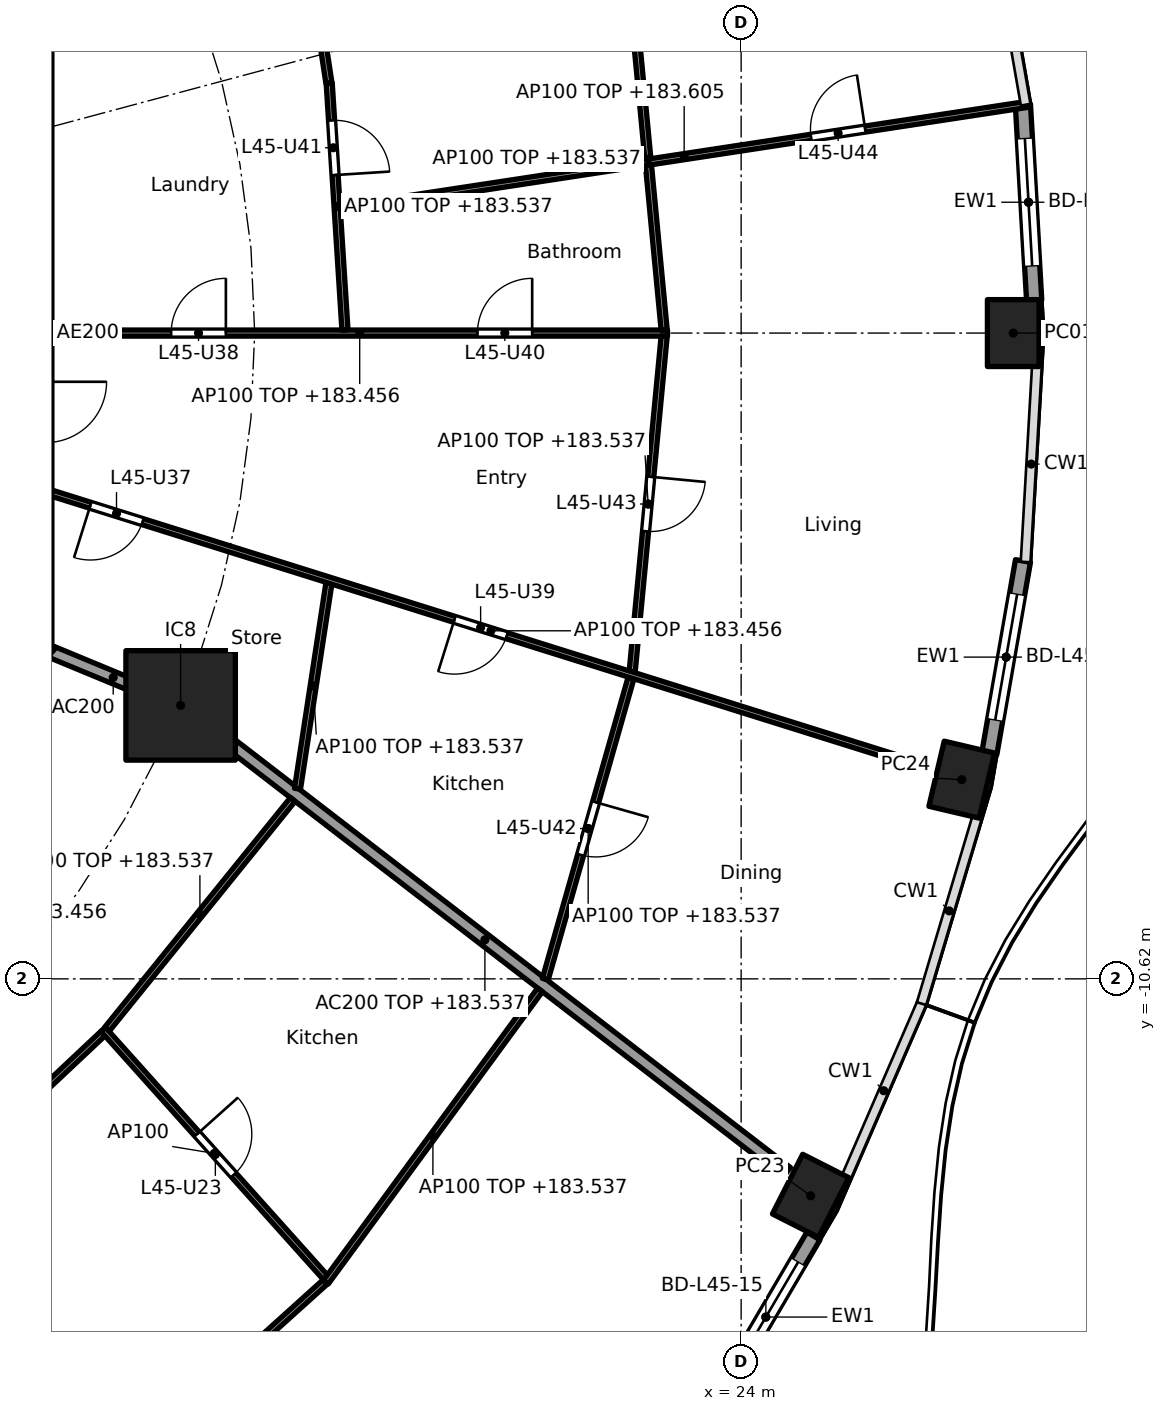
"""IFC4 building model, lengths in metres.
Left out: names, types, materials, properties, quantities, classifications, styles, units other than length and angle.
Written with IfcOpenShell. Run it as: python <this file> out.ifc"""

import sys

from ifc_helpers import new_model, si_unit, direction, frame, frame_2d, origin, origin_2d, place, context, subcontext, project, spatial, rectangle, hollow_rectangle, extrude, element, fill, save


model = new_model("IFC4")
c1 = context("Model", 3, precision=1e-05, world=origin(), true_north=direction((0.0, 1.0)))
c2 = subcontext(c1, "Body", "Model", "MODEL_VIEW")
j1 = project(units=[si_unit("LENGTHUNIT", "METRE"), si_unit("PLANEANGLEUNIT", "RADIAN")], contexts=[c1])
p1 = place(None, origin())
s1 = spatial("IfcSite", under=j1, at=p1, CompositionType="ELEMENT")
p2 = place(p1, origin())
s2 = spatial("IfcBuilding", under=s1, at=p2, CompositionType="ELEMENT")
p3 = place(p2, frame((0.0, 0.0, 180.7)))
s3 = spatial("IfcBuildingStorey", under=s2, at=p3, CompositionType="ELEMENT", Elevation=180.7)
for number, where, z_axis, x_axis in (
    (1, (28.475, 0.0, 0.0), (0.0, 0.0, 1.0), (0.0, 1.0, 0.0)),
    (2, (25.142, -14.188, 0.0), (0.0, 0.0, 1.0), (0.452, 0.892, 0.0)),
    (3, (27.627, -7.344, 0.0), (0.0, 0.0, 1.0), (0.229, 0.973, 0.0)),
):
    element("IfcColumn", number, at=place(p3, frame(where, z_axis=z_axis, x_axis=x_axis)), inside=s3, PredefinedType="COLUMN", context=c2, shape_type="SweptSolid", body=[
        extrude(hollow_rectangle(XDim=1.1, YDim=0.85, WallThickness=0.036, at=origin_2d()), origin(), (0.0, 0.0, 1.0), 3.7),
    ])
p4 = place(p3, frame((14.782, -6.123, 0.0), z_axis=(0.0, 0.0, 1.0), x_axis=(1.0, 0.0, 0.0)))
e4 = element("IfcColumn", 4, at=p4, inside=s3, PredefinedType="COLUMN", context=c2, shape_type="SweptSolid", body=[
    extrude(rectangle(XDim=1.8, YDim=1.8, at=origin_2d()), origin(), (0.0, 0.0, 1.0), 3.7),
])
p5 = place(p3, frame((28.633, 3.762, 0.0), z_axis=(0.0, 0.0, 1.0), x_axis=(0.057532692854, -0.998343622834, 0.0)))
e5 = element("IfcWall", 5, at=p5, inside=s3, PredefinedType="SOLIDWALL", context=c2, shape_type="SweptSolid", body=[
    extrude(rectangle(XDim=3.225, YDim=0.25, at=frame_2d((1.613, 0.0))), origin(), (0.0, 0.0, 1.0), 3.44),
])
p6 = place(p5, frame((0.562, 0.0, 0.0)))
e6 = element("IfcOpeningElement", 6, at=p6, cuts=e5, PredefinedType="OPENING", context=c2, shape_type="SweptSolid", body=[
    extrude(rectangle(XDim=2.1, YDim=2.4, at=frame_2d((1.05, 1.2))), frame((0.0, 0.135, 0.0), z_axis=(0.0, -1.0, 0.0), x_axis=(1.0, 0.0, 0.0)), (0.0, 0.0, 1.0), 0.27),
])
p7 = place(p3, frame((25.189, -14.848, 0.0), z_axis=(0.0, 0.0, 1.0), x_axis=(-0.506367803691, -0.862317602386, 0.0)))
e7 = element("IfcWall", 7, at=p7, inside=s3, PredefinedType="SOLIDWALL", context=c2, shape_type="SweptSolid", body=[
    extrude(rectangle(XDim=3.092, YDim=0.25, at=frame_2d((1.546, 0.0))), origin(), (0.0, 0.0, 1.0), 3.44),
])
p8 = place(p7, frame((0.496, 0.0, 0.0)))
e8 = element("IfcOpeningElement", 8, at=p8, cuts=e7, PredefinedType="OPENING", context=c2, shape_type="SweptSolid", body=[
    extrude(rectangle(XDim=2.1, YDim=2.4, at=frame_2d((1.05, 1.2))), frame((0.0, 0.135, 0.0), z_axis=(0.0, -1.0, 0.0), x_axis=(1.0, 0.0, 0.0)), (0.0, 0.0, 1.0), 0.27),
])
p9 = place(p3, frame((28.635, -3.747, 0.0), z_axis=(0.0, 0.0, 1.0), x_axis=(-0.172149769468, -0.985070787747, 0.0)))
e9 = element("IfcWall", 9, at=p9, inside=s3, PredefinedType="SOLIDWALL", context=c2, shape_type="SweptSolid", body=[
    extrude(rectangle(XDim=3.211, YDim=0.25, at=frame_2d((1.605, 0.0))), origin(), (0.0, 0.0, 1.0), 3.44),
])
p10 = place(p9, frame((0.555, 0.0, 0.0)))
e10 = element("IfcOpeningElement", 10, at=p10, cuts=e9, PredefinedType="OPENING", context=c2, shape_type="SweptSolid", body=[
    extrude(rectangle(XDim=2.1, YDim=2.4, at=frame_2d((1.05, 1.2))), frame((0.0, 0.135, 0.0), z_axis=(0.0, -1.0, 0.0), x_axis=(1.0, 0.0, 0.0)), (0.0, 0.0, 1.0), 0.27),
])
p11 = place(p3, frame((12.657, -5.243, 0.0), z_axis=(0.0, 0.0, 1.0), x_axis=(0.92383017907, -0.382802560388, 0.0)))
e11 = element("IfcWall", 11, at=p11, inside=s3, PredefinedType="PARTITIONING", context=c2, shape_type="SweptSolid", body=[
    extrude(rectangle(XDim=2.2, YDim=0.2, at=frame_2d((1.1, 0.0))), origin(), (0.0, 0.0, 1.0), 3.44),
])
p12 = place(p3, frame((14.822, -6.154, 0.0), z_axis=(0.0, 0.0, 1.0), x_axis=(0.792203056092, -0.610257583254, 0.0)))
e12 = element("IfcWall", 12, at=p12, inside=s3, PredefinedType="PARTITIONING", context=c2, shape_type="SweptSolid", body=[
    extrude(rectangle(XDim=12.533, YDim=0.2, at=frame_2d((6.266, 0.0))), origin(), (0.0, 0.0, 1.0), 2.837),
])
p13 = place(p3, frame((5.275, -12.494, 0.0), z_axis=(0.0, 0.0, 1.0), x_axis=(0.707106781187, 0.707106781187, 0.0)))
e13 = element("IfcWall", 13, at=p13, inside=s3, PredefinedType="PARTITIONING", context=c2, shape_type="SweptSolid", body=[
    extrude(rectangle(XDim=10.409, YDim=0.2, at=frame_2d((5.205, 0.0))), origin(), (0.0, 0.0, 1.0), 3.44),
])
p14 = place(p3, frame((12.665, 0.0, 0.0), z_axis=(0.0, 0.0, 1.0), x_axis=(1.0, 0.0, 0.0)))
e14 = element("IfcWall", 14, at=p14, inside=s3, PredefinedType="PARTITIONING", context=c2, shape_type="SweptSolid", body=[
    extrude(rectangle(XDim=10.124, YDim=0.1, at=frame_2d((5.062, 0.0))), origin(), (0.0, 0.0, 1.0), 2.756),
])
p15 = place(p14, frame((1.961, 0.0, 0.0)))
e15 = element("IfcOpeningElement", 15, at=p15, cuts=e14, PredefinedType="OPENING", context=c2, shape_type="SweptSolid", body=[
    extrude(rectangle(XDim=0.9, YDim=2.1, at=frame_2d((0.45, 1.05))), frame((0.0, 0.06, 0.0), z_axis=(0.0, -1.0, 0.0), x_axis=(1.0, 0.0, 0.0)), (0.0, 0.0, 1.0), 0.12),
])
p16 = place(p14, frame((6.999, 0.0, 0.0)))
e16 = element("IfcOpeningElement", 16, at=p16, cuts=e14, PredefinedType="OPENING", context=c2, shape_type="SweptSolid", body=[
    extrude(rectangle(XDim=0.9, YDim=2.1, at=frame_2d((0.45, 1.05))), frame((0.0, 0.06, 0.0), z_axis=(0.0, -1.0, 0.0), x_axis=(1.0, 0.0, 0.0)), (0.0, 0.0, 1.0), 0.12),
])
p17 = place(p3, frame((17.485, 0.05, 0.0), z_axis=(0.0, 0.0, 1.0), x_axis=(-0.063673473968, 0.997970785501, 0.0)))
e17 = element("IfcWall", 17, at=p17, inside=s3, PredefinedType="PARTITIONING", context=c2, shape_type="SweptSolid", body=[
    extrude(rectangle(XDim=4.072, YDim=0.1, at=frame_2d((2.036, 0.0))), origin(), (0.0, 0.0, 1.0), 2.837),
])
p18 = place(p17, frame((2.554, 0.0, 0.0)))
e18 = element("IfcOpeningElement", 18, at=p18, cuts=e17, PredefinedType="OPENING", context=c2, shape_type="SweptSolid", body=[
    extrude(rectangle(XDim=0.9, YDim=2.1, at=frame_2d((0.45, 1.05))), frame((0.0, 0.06, 0.0), z_axis=(0.0, -1.0, 0.0), x_axis=(1.0, 0.0, 0.0)), (0.0, 0.0, 1.0), 0.12),
])
p19 = place(p3, frame((22.734, 0.05, 0.0), z_axis=(0.0, 0.0, 1.0), x_axis=(-0.0949274088, 0.995484197292, 0.0)))
e19 = element("IfcWall", 19, at=p19, inside=s3, PredefinedType="PARTITIONING", context=c2, shape_type="SweptSolid", body=[
    extrude(rectangle(XDim=5.648, YDim=0.1, at=frame_2d((2.824, 0.0))), origin(), (0.0, 0.0, 1.0), 2.837),
])
p20 = place(p3, frame((22.734, -0.05, 0.0), z_axis=(0.0, 0.0, 1.0), x_axis=(-0.094923312677, -0.995484587882, 0.0)))
e20 = element("IfcWall", 20, at=p20, inside=s3, PredefinedType="PARTITIONING", context=c2, shape_type="SweptSolid", body=[
    extrude(rectangle(XDim=5.548, YDim=0.1, at=frame_2d((2.774, 0.0))), origin(), (0.0, 0.0, 1.0), 2.837),
])
p21 = place(p20, frame((2.324, 0.0, 0.0)))
e21 = element("IfcOpeningElement", 21, at=p21, cuts=e20, PredefinedType="OPENING", context=c2, shape_type="SweptSolid", body=[
    extrude(rectangle(XDim=0.9, YDim=2.1, at=frame_2d((0.45, 1.05))), frame((0.0, 0.06, 0.0), z_axis=(0.0, -1.0, 0.0), x_axis=(1.0, 0.0, 0.0)), (0.0, 0.0, 1.0), 0.12),
])
p22 = place(p3, frame((17.407, 2.039, 0.0), z_axis=(0.0, 0.0, 1.0), x_axis=(0.98858728603, 0.150649188184, 0.0)))
e22 = element("IfcWall", 22, at=p22, inside=s3, PredefinedType="PARTITIONING", context=c2, shape_type="SweptSolid", body=[
    extrude(rectangle(XDim=11.441, YDim=0.1, at=frame_2d((5.721, 0.0))), origin(), (0.0, 0.0, 1.0), 2.905),
])
p23 = place(p22, frame((7.832, 0.0, 0.0)))
e23 = element("IfcOpeningElement", 23, at=p23, cuts=e22, PredefinedType="OPENING", context=c2, shape_type="SweptSolid", body=[
    extrude(rectangle(XDim=0.9, YDim=2.1, at=frame_2d((0.45, 1.05))), frame((0.0, 0.06, 0.0), z_axis=(0.0, -1.0, 0.0), x_axis=(1.0, 0.0, 0.0)), (0.0, 0.0, 1.0), 0.12),
])
p24 = place(p3, frame((17.221, 4.113, 0.0), z_axis=(0.0, 0.0, 1.0), x_axis=(-0.1510806336, 0.988521442434, 0.0)))
e24 = element("IfcWall", 24, at=p24, inside=s3, PredefinedType="PARTITIONING", context=c2, shape_type="SweptSolid", body=[
    extrude(rectangle(XDim=3.419, YDim=0.1, at=frame_2d((1.71, 0.0))), origin(), (0.0, 0.0, 1.0), 2.837),
])
p25 = place(p3, frame((10.21, -14.614, 0.0), z_axis=(0.0, 0.0, 1.0), x_axis=(0.728883199496, 0.684638066055, 0.0)))
e25 = element("IfcWall", 25, at=p25, inside=s3, PredefinedType="PARTITIONING", context=c2, shape_type="SweptSolid", body=[
    extrude(rectangle(XDim=4.519, YDim=0.1, at=frame_2d((2.26, 0.0))), origin(), (0.0, 0.0, 1.0), 2.837),
])
p26 = place(p3, frame((13.045, -19.313, 0.0), z_axis=(0.0, 0.0, 1.0), x_axis=(0.742790086539, 0.66952437397, 0.0)))
e26 = element("IfcWall", 26, at=p26, inside=s3, PredefinedType="PARTITIONING", context=c2, shape_type="SweptSolid", body=[
    extrude(rectangle(XDim=5.542, YDim=0.1, at=frame_2d((2.771, 0.0))), origin(), (0.0, 0.0, 1.0), 2.837),
])
p27 = place(p26, frame((2.321, 0.0, 0.0)))
e27 = element("IfcOpeningElement", 27, at=p27, cuts=e26, PredefinedType="OPENING", context=c2, shape_type="SweptSolid", body=[
    extrude(rectangle(XDim=0.9, YDim=2.1, at=frame_2d((0.45, 1.05))), frame((0.0, 0.06, 0.0), z_axis=(0.0, -1.0, 0.0), x_axis=(1.0, 0.0, 0.0)), (0.0, 0.0, 1.0), 0.12),
])
p28 = place(p3, frame((13.507, -11.449, 0.0), z_axis=(0.0, 0.0, 1.0), x_axis=(0.667299792168, -0.744789223453, 0.0)))
e28 = element("IfcWall", 28, at=p28, inside=s3, PredefinedType="PARTITIONING", context=c2, shape_type="SweptSolid", body=[
    extrude(rectangle(XDim=5.482, YDim=0.1, at=frame_2d((2.741, 0.0))), origin(), (0.0, 0.0, 1.0), 3.44),
])
p29 = place(p28, frame((2.316, 0.0, 0.0)))
e29 = element("IfcOpeningElement", 29, at=p29, cuts=e28, PredefinedType="OPENING", context=c2, shape_type="SweptSolid", body=[
    extrude(rectangle(XDim=0.9, YDim=2.1, at=frame_2d((0.45, 1.05))), frame((0.0, 0.06, 0.0), z_axis=(0.0, -1.0, 0.0), x_axis=(1.0, 0.0, 0.0)), (0.0, 0.0, 1.0), 0.12),
])
p30 = place(p3, frame((13.572, -11.447, 0.0), z_axis=(0.0, 0.0, 1.0), x_axis=(0.628738316533, 0.777616955399, 0.0)))
e30 = element("IfcWall", 30, at=p30, inside=s3, PredefinedType="PARTITIONING", context=c2, shape_type="SweptSolid", body=[
    extrude(rectangle(XDim=4.857, YDim=0.1, at=frame_2d((2.429, 0.0))), origin(), (0.0, 0.0, 1.0), 2.837),
])
p31 = place(p3, frame((17.169, -15.609, 0.0), z_axis=(0.0, 0.0, 1.0), x_axis=(0.591122127251, 0.806582066918, 0.0)))
e31 = element("IfcWall", 31, at=p31, inside=s3, PredefinedType="PARTITIONING", context=c2, shape_type="SweptSolid", body=[
    extrude(rectangle(XDim=5.96, YDim=0.1, at=frame_2d((2.98, 0.0))), origin(), (0.0, 0.0, 1.0), 2.837),
])
p32 = place(p3, frame((16.704, -7.493, 0.0), z_axis=(0.0, 0.0, 1.0), x_axis=(0.1510806336, 0.988521442434, 0.0)))
e32 = element("IfcWall", 32, at=p32, inside=s3, PredefinedType="PARTITIONING", context=c2, shape_type="SweptSolid", body=[
    extrude(rectangle(XDim=3.419, YDim=0.1, at=frame_2d((1.71, 0.0))), origin(), (0.0, 0.0, 1.0), 2.837),
])
p33 = place(p3, frame((20.779, -10.625, 0.0), z_axis=(0.0, 0.0, 1.0), x_axis=(0.273819702124, 0.961781040949, 0.0)))
e33 = element("IfcWall", 33, at=p33, inside=s3, PredefinedType="PARTITIONING", context=c2, shape_type="SweptSolid", body=[
    extrude(rectangle(XDim=5.152, YDim=0.1, at=frame_2d((2.576, 0.0))), origin(), (0.0, 0.0, 1.0), 2.837),
])
p34 = place(p33, frame((2.126, 0.0, 0.0)))
e34 = element("IfcOpeningElement", 34, at=p34, cuts=e33, PredefinedType="OPENING", context=c2, shape_type="SweptSolid", body=[
    extrude(rectangle(XDim=0.9, YDim=2.1, at=frame_2d((0.45, 1.05))), frame((0.0, 0.06, 0.0), z_axis=(0.0, -1.0, 0.0), x_axis=(1.0, 0.0, 0.0)), (0.0, 0.0, 1.0), 0.12),
])
p35 = place(p3, frame((12.66, -2.632, 0.0), z_axis=(0.0, 0.0, 1.0), x_axis=(0.954248738607, -0.299013954302, 0.0)))
e35 = element("IfcWall", 35, at=p35, inside=s3, PredefinedType="PARTITIONING", context=c2, shape_type="SweptSolid", body=[
    extrude(rectangle(XDim=15.142, YDim=0.1, at=frame_2d((7.571, 0.0))), origin(), (0.0, 0.0, 1.0), 2.756),
])
p36 = place(p35, frame((0.669, 0.0, 0.0)))
e36 = element("IfcOpeningElement", 36, at=p36, cuts=e35, PredefinedType="OPENING", context=c2, shape_type="SweptSolid", body=[
    extrude(rectangle(XDim=0.9, YDim=2.1, at=frame_2d((0.45, 1.05))), frame((0.0, 0.06, 0.0), z_axis=(0.0, -1.0, 0.0), x_axis=(1.0, 0.0, 0.0)), (0.0, 0.0, 1.0), 0.12),
])
p37 = place(p35, frame((6.944, 0.0, 0.0)))
e37 = element("IfcOpeningElement", 37, at=p37, cuts=e35, PredefinedType="OPENING", context=c2, shape_type="SweptSolid", body=[
    extrude(rectangle(XDim=0.9, YDim=2.1, at=frame_2d((0.45, 1.05))), frame((0.0, 0.06, 0.0), z_axis=(0.0, -1.0, 0.0), x_axis=(1.0, 0.0, 0.0)), (0.0, 0.0, 1.0), 0.12),
])
p38 = place(p6, origin())
e38 = element("IfcDoor", 38, at=p38, inside=s3, OperationType="SLIDING_TO_LEFT", PredefinedType="DOOR", context=c2, shape_type="SweptSolid", body=[
    extrude(rectangle(XDim=2.1, YDim=2.4, at=frame_2d((1.05, 1.2))), frame((0.0, 0.025, 0.0), z_axis=(0.0, -1.0, 0.0), x_axis=(1.0, 0.0, 0.0)), (0.0, 0.0, 1.0), 0.05),
])
fill(e6, e38)
p39 = place(p8, origin())
e39 = element("IfcDoor", 39, at=p39, inside=s3, OperationType="SLIDING_TO_LEFT", PredefinedType="DOOR", context=c2, shape_type="SweptSolid", body=[
    extrude(rectangle(XDim=2.1, YDim=2.4, at=frame_2d((1.05, 1.2))), frame((0.0, 0.025, 0.0), z_axis=(0.0, -1.0, 0.0), x_axis=(1.0, 0.0, 0.0)), (0.0, 0.0, 1.0), 0.05),
])
fill(e8, e39)
p40 = place(p10, origin())
e40 = element("IfcDoor", 40, at=p40, inside=s3, OperationType="SLIDING_TO_LEFT", PredefinedType="DOOR", context=c2, shape_type="SweptSolid", body=[
    extrude(rectangle(XDim=2.1, YDim=2.4, at=frame_2d((1.05, 1.2))), frame((0.0, 0.025, 0.0), z_axis=(0.0, -1.0, 0.0), x_axis=(1.0, 0.0, 0.0)), (0.0, 0.0, 1.0), 0.05),
])
fill(e10, e40)
p41 = place(p29, origin())
e41 = element("IfcDoor", 41, at=p41, inside=s3, OperationType="SINGLE_SWING_LEFT", PredefinedType="DOOR", context=c2, shape_type="SweptSolid", body=[
    extrude(rectangle(XDim=0.9, YDim=2.1, at=frame_2d((0.45, 1.05))), frame((0.0, 0.025, 0.0), z_axis=(0.0, -1.0, 0.0), x_axis=(1.0, 0.0, 0.0)), (0.0, 0.0, 1.0), 0.05),
])
fill(e29, e41)
p42 = place(p36, frame((0.9, 0.0, 0.0), x_axis=(-1.0, 0.0, 0.0)))
e42 = element("IfcDoor", 42, at=p42, inside=s3, OperationType="SINGLE_SWING_RIGHT", PredefinedType="DOOR", context=c2, shape_type="SweptSolid", body=[
    extrude(rectangle(XDim=0.9, YDim=2.1, at=frame_2d((0.45, 1.05))), frame((0.0, 0.025, 0.0), z_axis=(0.0, -1.0, 0.0), x_axis=(1.0, 0.0, 0.0)), (0.0, 0.0, 1.0), 0.05),
])
fill(e36, e42)
p43 = place(p15, origin())
e43 = element("IfcDoor", 43, at=p43, inside=s3, OperationType="SINGLE_SWING_RIGHT", PredefinedType="DOOR", context=c2, shape_type="SweptSolid", body=[
    extrude(rectangle(XDim=0.9, YDim=2.1, at=frame_2d((0.45, 1.05))), frame((0.0, 0.025, 0.0), z_axis=(0.0, -1.0, 0.0), x_axis=(1.0, 0.0, 0.0)), (0.0, 0.0, 1.0), 0.05),
])
fill(e15, e43)
p44 = place(p37, frame((0.9, 0.0, 0.0), x_axis=(-1.0, 0.0, 0.0)))
e44 = element("IfcDoor", 44, at=p44, inside=s3, OperationType="SINGLE_SWING_RIGHT", PredefinedType="DOOR", context=c2, shape_type="SweptSolid", body=[
    extrude(rectangle(XDim=0.9, YDim=2.1, at=frame_2d((0.45, 1.05))), frame((0.0, 0.025, 0.0), z_axis=(0.0, -1.0, 0.0), x_axis=(1.0, 0.0, 0.0)), (0.0, 0.0, 1.0), 0.05),
])
fill(e37, e44)
p45 = place(p16, origin())
e45 = element("IfcDoor", 45, at=p45, inside=s3, OperationType="SINGLE_SWING_RIGHT", PredefinedType="DOOR", context=c2, shape_type="SweptSolid", body=[
    extrude(rectangle(XDim=0.9, YDim=2.1, at=frame_2d((0.45, 1.05))), frame((0.0, 0.025, 0.0), z_axis=(0.0, -1.0, 0.0), x_axis=(1.0, 0.0, 0.0)), (0.0, 0.0, 1.0), 0.05),
])
fill(e16, e45)
p46 = place(p18, frame((0.9, 0.0, 0.0), x_axis=(-1.0, 0.0, 0.0)))
e46 = element("IfcDoor", 46, at=p46, inside=s3, OperationType="SINGLE_SWING_RIGHT", PredefinedType="DOOR", context=c2, shape_type="SweptSolid", body=[
    extrude(rectangle(XDim=0.9, YDim=2.1, at=frame_2d((0.45, 1.05))), frame((0.0, 0.025, 0.0), z_axis=(0.0, -1.0, 0.0), x_axis=(1.0, 0.0, 0.0)), (0.0, 0.0, 1.0), 0.05),
])
fill(e18, e46)
p47 = place(p34, frame((0.9, 0.0, 0.0), x_axis=(-1.0, 0.0, 0.0)))
e47 = element("IfcDoor", 47, at=p47, inside=s3, OperationType="SINGLE_SWING_LEFT", PredefinedType="DOOR", context=c2, shape_type="SweptSolid", body=[
    extrude(rectangle(XDim=0.9, YDim=2.1, at=frame_2d((0.45, 1.05))), frame((0.0, 0.025, 0.0), z_axis=(0.0, -1.0, 0.0), x_axis=(1.0, 0.0, 0.0)), (0.0, 0.0, 1.0), 0.05),
])
fill(e34, e47)
p48 = place(p21, origin())
e48 = element("IfcDoor", 48, at=p48, inside=s3, OperationType="SINGLE_SWING_LEFT", PredefinedType="DOOR", context=c2, shape_type="SweptSolid", body=[
    extrude(rectangle(XDim=0.9, YDim=2.1, at=frame_2d((0.45, 1.05))), frame((0.0, 0.025, 0.0), z_axis=(0.0, -1.0, 0.0), x_axis=(1.0, 0.0, 0.0)), (0.0, 0.0, 1.0), 0.05),
])
fill(e21, e48)
p49 = place(p23, origin())
e49 = element("IfcDoor", 49, at=p49, inside=s3, OperationType="SINGLE_SWING_RIGHT", PredefinedType="DOOR", context=c2, shape_type="SweptSolid", body=[
    extrude(rectangle(XDim=0.9, YDim=2.1, at=frame_2d((0.45, 1.05))), frame((0.0, 0.025, 0.0), z_axis=(0.0, -1.0, 0.0), x_axis=(1.0, 0.0, 0.0)), (0.0, 0.0, 1.0), 0.05),
])
fill(e23, e49)
save(model, sys.argv[1])
